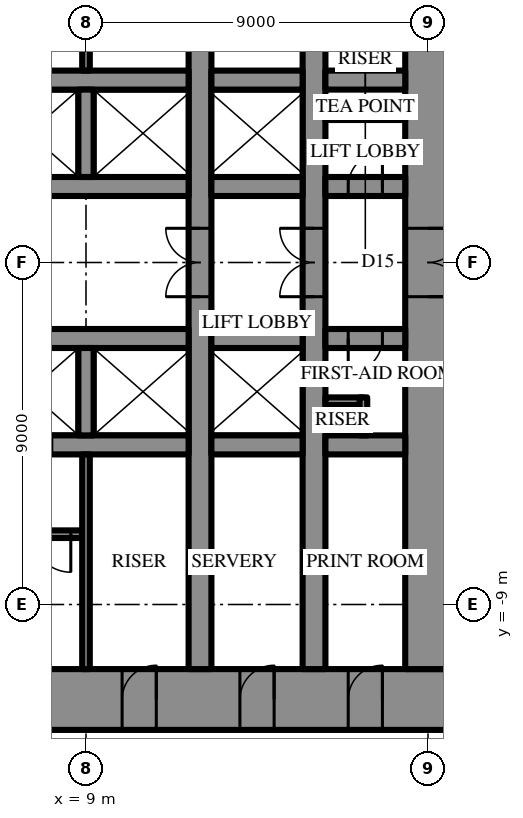
"""IFC4 building model, lengths in metres.
Left out: names, types, materials, properties, quantities, classifications, styles, units other than length and angle.
Written with IfcOpenShell. Run it as: python <this file> out.ifc"""

import sys

from ifc_helpers import new_model, si_unit, direction, frame, frame_2d, origin, place, context, subcontext, project, spatial, rectangle, extrude, element, fill, save


model = new_model("IFC4")
c1 = context("Model", 3, precision=1e-05, world=origin(), true_north=direction((0.0, 1.0)))
c2 = subcontext(c1, "Body", "Model", "MODEL_VIEW")
j1 = project(units=[si_unit("LENGTHUNIT", "METRE"), si_unit("PLANEANGLEUNIT", "RADIAN")], contexts=[c1])
p1 = place(None, origin())
s1 = spatial("IfcSite", under=j1, at=p1, CompositionType="ELEMENT")
p2 = place(p1, origin())
s2 = spatial("IfcBuilding", under=s1, at=p2, CompositionType="ELEMENT")
p3 = place(p2, frame((0.0, 0.0, 153.1)))
s3 = spatial("IfcBuildingStorey", under=s2, at=p3, CompositionType="ELEMENT", Elevation=153.1)
p4 = place(p3, frame((18.6, -11.5, 0.0), z_axis=(0.0, 0.0, 1.0), x_axis=(-1.0, 0.0, 0.0)))
e1 = element("IfcWall", 1, at=p4, inside=s3, PredefinedType="SHEAR", context=c2, shape_type="SweptSolid", body=[
    extrude(rectangle(XDim=37.2, YDim=1.6, at=frame_2d((18.6, 0.0))), origin(), (0.0, 0.0, 1.0), 4.2),
])
p5 = place(p4, frame((19.45, 0.0, 0.0)))
e2 = element("IfcOpeningElement", 2, at=p5, cuts=e1, PredefinedType="OPENING", context=c2, shape_type="SweptSolid", body=[
    extrude(rectangle(XDim=0.9, YDim=2.2, at=frame_2d((0.45, 1.1))), frame((0.0, 0.81, 0.0), z_axis=(0.0, -1.0, 0.0), x_axis=(1.0, 0.0, 0.0)), (0.0, 0.0, 1.0), 1.62),
])
p6 = place(p4, frame((22.45, 0.0, 0.0)))
e3 = element("IfcOpeningElement", 3, at=p6, cuts=e1, PredefinedType="OPENING", context=c2, shape_type="SweptSolid", body=[
    extrude(rectangle(XDim=0.9, YDim=2.2, at=frame_2d((0.45, 1.1))), frame((0.0, 0.81, 0.0), z_axis=(0.0, -1.0, 0.0), x_axis=(1.0, 0.0, 0.0)), (0.0, 0.0, 1.0), 1.62),
])
p7 = place(p4, frame((25.5, 0.0, 0.0)))
e4 = element("IfcOpeningElement", 4, at=p7, cuts=e1, PredefinedType="OPENING", context=c2, shape_type="SweptSolid", body=[
    extrude(rectangle(XDim=1.0, YDim=2.2, at=frame_2d((0.5, 1.1))), frame((0.0, 0.81, 0.0), z_axis=(0.0, -1.0, 0.0), x_axis=(1.0, 0.0, 0.0)), (0.0, 0.0, 1.0), 1.62),
])
p8 = place(p4, frame((1.8, 0.0, 0.0)))
e5 = element("IfcOpeningElement", 5, at=p8, cuts=e1, PredefinedType="OPENING", context=c2, shape_type="SweptSolid", body=[
    extrude(rectangle(XDim=0.9, YDim=2.2, at=frame_2d((0.45, 1.1))), frame((0.0, 0.81, 0.0), z_axis=(0.0, -1.0, 0.0), x_axis=(1.0, 0.0, 0.0)), (0.0, 0.0, 1.0), 1.62),
])
p9 = place(p4, frame((4.65, 0.0, 0.0)))
e6 = element("IfcOpeningElement", 6, at=p9, cuts=e1, PredefinedType="OPENING", context=c2, shape_type="SweptSolid", body=[
    extrude(rectangle(XDim=0.9, YDim=2.2, at=frame_2d((0.45, 1.1))), frame((0.0, 0.81, 0.0), z_axis=(0.0, -1.0, 0.0), x_axis=(1.0, 0.0, 0.0)), (0.0, 0.0, 1.0), 1.62),
])
p10 = place(p4, frame((7.75, 0.0, 0.0)))
e7 = element("IfcOpeningElement", 7, at=p10, cuts=e1, PredefinedType="OPENING", context=c2, shape_type="SweptSolid", body=[
    extrude(rectangle(XDim=0.9, YDim=2.2, at=frame_2d((0.45, 1.1))), frame((0.0, 0.81, 0.0), z_axis=(0.0, -1.0, 0.0), x_axis=(1.0, 0.0, 0.0)), (0.0, 0.0, 1.0), 1.62),
])
p11 = place(p4, frame((28.55, 0.0, 0.0)))
e8 = element("IfcOpeningElement", 8, at=p11, cuts=e1, PredefinedType="OPENING", context=c2, shape_type="SweptSolid", body=[
    extrude(rectangle(XDim=0.9, YDim=2.2, at=frame_2d((0.45, 1.1))), frame((0.0, 0.81, 0.0), z_axis=(0.0, -1.0, 0.0), x_axis=(1.0, 0.0, 0.0)), (0.0, 0.0, 1.0), 1.62),
])
p12 = place(p4, frame((31.65, 0.0, 0.0)))
e9 = element("IfcOpeningElement", 9, at=p12, cuts=e1, PredefinedType="OPENING", context=c2, shape_type="SweptSolid", body=[
    extrude(rectangle(XDim=0.9, YDim=2.2, at=frame_2d((0.45, 1.1))), frame((0.0, 0.81, 0.0), z_axis=(0.0, -1.0, 0.0), x_axis=(1.0, 0.0, 0.0)), (0.0, 0.0, 1.0), 1.62),
])
p13 = place(p4, frame((34.5, 0.0, 0.0)))
e10 = element("IfcOpeningElement", 10, at=p13, cuts=e1, PredefinedType="OPENING", context=c2, shape_type="SweptSolid", body=[
    extrude(rectangle(XDim=0.9, YDim=2.2, at=frame_2d((0.45, 1.1))), frame((0.0, 0.81, 0.0), z_axis=(0.0, -1.0, 0.0), x_axis=(1.0, 0.0, 0.0)), (0.0, 0.0, 1.0), 1.62),
])
p14 = place(p3, frame((18.0, -10.7, 0.0), z_axis=(0.0, 0.0, 1.0), x_axis=(0.0, 1.0, 0.0)))
e11 = element("IfcWall", 11, at=p14, inside=s3, PredefinedType="SHEAR", context=c2, shape_type="SweptSolid", body=[
    extrude(rectangle(XDim=21.4, YDim=1.2, at=frame_2d((10.7, 0.0))), origin(), (0.0, 0.0, 1.0), 4.2),
])
p15 = place(p14, frame((9.8, 0.0, 0.0)))
e12 = element("IfcOpeningElement", 12, at=p15, cuts=e11, PredefinedType="OPENING", context=c2, shape_type="SweptSolid", body=[
    extrude(rectangle(XDim=1.8, YDim=2.4, at=frame_2d((0.9, 1.2))), frame((0.0, 0.61, 0.0), z_axis=(0.0, -1.0, 0.0), x_axis=(1.0, 0.0, 0.0)), (0.0, 0.0, 1.0), 1.22),
])
p16 = place(p3, frame((12.0, -10.7, 0.0), z_axis=(0.0, 0.0, 1.0), x_axis=(0.0, 1.0, 0.0)))
e13 = element("IfcWall", 13, at=p16, inside=s3, PredefinedType="SHEAR", context=c2, shape_type="SweptSolid", body=[
    extrude(rectangle(XDim=21.4, YDim=0.6, at=frame_2d((10.7, 0.0))), origin(), (0.0, 0.0, 1.0), 4.2),
])
p17 = place(p16, frame((9.8, 0.0, 0.0)))
e14 = element("IfcOpeningElement", 14, at=p17, cuts=e13, PredefinedType="OPENING", context=c2, shape_type="SweptSolid", body=[
    extrude(rectangle(XDim=1.8, YDim=2.4, at=frame_2d((0.9, 1.2))), frame((0.0, 0.31, 0.0), z_axis=(0.0, -1.0, 0.0), x_axis=(1.0, 0.0, 0.0)), (0.0, 0.0, 1.0), 0.62),
])
p18 = place(p3, frame((15.0, -10.7, 0.0), z_axis=(0.0, 0.0, 1.0), x_axis=(0.0, 1.0, 0.0)))
e15 = element("IfcWall", 15, at=p18, inside=s3, PredefinedType="SHEAR", context=c2, shape_type="SweptSolid", body=[
    extrude(rectangle(XDim=21.4, YDim=0.6, at=frame_2d((10.7, 0.0))), origin(), (0.0, 0.0, 1.0), 4.2),
])
p19 = place(p18, frame((9.8, 0.0, 0.0)))
e16 = element("IfcOpeningElement", 16, at=p19, cuts=e15, PredefinedType="OPENING", context=c2, shape_type="SweptSolid", body=[
    extrude(rectangle(XDim=1.8, YDim=2.4, at=frame_2d((0.9, 1.2))), frame((0.0, 0.31, 0.0), z_axis=(0.0, -1.0, 0.0), x_axis=(1.0, 0.0, 0.0)), (0.0, 0.0, 1.0), 0.62),
])
p20 = place(p3, frame((-3.2, 2.0, 0.0), z_axis=(0.0, 0.0, 1.0), x_axis=(1.0, 0.0, 0.0)))
e17 = element("IfcWall", 17, at=p20, inside=s3, PredefinedType="SHEAR", context=c2, shape_type="SweptSolid", body=[
    extrude(rectangle(XDim=14.9, YDim=0.5, at=frame_2d((7.45, 0.0))), origin(), (0.0, 0.0, 1.0), 4.2),
])
p21 = place(p20, frame((1.15, 0.0, 0.0)))
e18 = element("IfcOpeningElement", 18, at=p21, cuts=e17, PredefinedType="OPENING", context=c2, shape_type="SweptSolid", body=[
    extrude(rectangle(XDim=1.1, YDim=2.2, at=frame_2d((0.55, 1.1))), frame((0.0, 0.26, 0.0), z_axis=(0.0, -1.0, 0.0), x_axis=(1.0, 0.0, 0.0)), (0.0, 0.0, 1.0), 0.52),
])
p22 = place(p20, frame((4.15, 0.0, 0.0)))
e19 = element("IfcOpeningElement", 19, at=p22, cuts=e17, PredefinedType="OPENING", context=c2, shape_type="SweptSolid", body=[
    extrude(rectangle(XDim=1.1, YDim=2.2, at=frame_2d((0.55, 1.1))), frame((0.0, 0.26, 0.0), z_axis=(0.0, -1.0, 0.0), x_axis=(1.0, 0.0, 0.0)), (0.0, 0.0, 1.0), 0.52),
])
p23 = place(p20, frame((7.15, 0.0, 0.0)))
e20 = element("IfcOpeningElement", 20, at=p23, cuts=e17, PredefinedType="OPENING", context=c2, shape_type="SweptSolid", body=[
    extrude(rectangle(XDim=1.1, YDim=2.2, at=frame_2d((0.55, 1.1))), frame((0.0, 0.26, 0.0), z_axis=(0.0, -1.0, 0.0), x_axis=(1.0, 0.0, 0.0)), (0.0, 0.0, 1.0), 0.52),
])
p24 = place(p20, frame((10.15, 0.0, 0.0)))
e21 = element("IfcOpeningElement", 21, at=p24, cuts=e17, PredefinedType="OPENING", context=c2, shape_type="SweptSolid", body=[
    extrude(rectangle(XDim=1.1, YDim=2.2, at=frame_2d((0.55, 1.1))), frame((0.0, 0.26, 0.0), z_axis=(0.0, -1.0, 0.0), x_axis=(1.0, 0.0, 0.0)), (0.0, 0.0, 1.0), 0.52),
])
p25 = place(p3, frame((12.3, 2.0, 0.0), z_axis=(0.0, 0.0, 1.0), x_axis=(1.0, 0.0, 0.0)))
e22 = element("IfcWall", 22, at=p25, inside=s3, PredefinedType="SHEAR", context=c2, shape_type="SweptSolid", body=[
    extrude(rectangle(XDim=2.4, YDim=0.5, at=frame_2d((1.2, 0.0))), origin(), (0.0, 0.0, 1.0), 4.2),
])
p26 = place(p3, frame((15.3, 2.0, 0.0), z_axis=(0.0, 0.0, 1.0), x_axis=(1.0, 0.0, 0.0)))
e23 = element("IfcWall", 23, at=p26, inside=s3, PredefinedType="SHEAR", context=c2, shape_type="SweptSolid", body=[
    extrude(rectangle(XDim=2.1, YDim=0.5, at=frame_2d((1.05, 0.0))), origin(), (0.0, 0.0, 1.0), 4.2),
])
p27 = place(p26, frame((0.6, 0.0, 0.0)))
e24 = element("IfcOpeningElement", 24, at=p27, cuts=e23, PredefinedType="OPENING", context=c2, shape_type="SweptSolid", body=[
    extrude(rectangle(XDim=0.9, YDim=2.2, at=frame_2d((0.45, 1.1))), frame((0.0, 0.26, 0.0), z_axis=(0.0, -1.0, 0.0), x_axis=(1.0, 0.0, 0.0)), (0.0, 0.0, 1.0), 0.52),
])
p28 = place(p3, frame((-11.7, 4.8, 0.0), z_axis=(0.0, 0.0, 1.0), x_axis=(1.0, 0.0, 0.0)))
e25 = element("IfcWall", 25, at=p28, inside=s3, PredefinedType="SHEAR", context=c2, shape_type="SweptSolid", body=[
    extrude(rectangle(XDim=23.4, YDim=0.5, at=frame_2d((11.7, 0.0))), origin(), (0.0, 0.0, 1.0), 4.2),
])
p29 = place(p28, frame((6.6, 0.0, 0.0)))
e26 = element("IfcOpeningElement", 26, at=p29, cuts=e25, PredefinedType="OPENING", context=c2, shape_type="SweptSolid", body=[
    extrude(rectangle(XDim=1.2, YDim=2.2, at=frame_2d((0.6, 1.1))), frame((0.0, 0.26, 0.0), z_axis=(0.0, -1.0, 0.0), x_axis=(1.0, 0.0, 0.0)), (0.0, 0.0, 1.0), 0.52),
])
p30 = place(p28, frame((3.6, 0.0, 0.0)))
e27 = element("IfcOpeningElement", 27, at=p30, cuts=e25, PredefinedType="OPENING", context=c2, shape_type="SweptSolid", body=[
    extrude(rectangle(XDim=1.2, YDim=2.2, at=frame_2d((0.6, 1.1))), frame((0.0, 0.26, 0.0), z_axis=(0.0, -1.0, 0.0), x_axis=(1.0, 0.0, 0.0)), (0.0, 0.0, 1.0), 0.52),
])
p31 = place(p3, frame((12.3, 4.8, 0.0), z_axis=(0.0, 0.0, 1.0), x_axis=(1.0, 0.0, 0.0)))
e28 = element("IfcWall", 28, at=p31, inside=s3, PredefinedType="SHEAR", context=c2, shape_type="SweptSolid", body=[
    extrude(rectangle(XDim=2.4, YDim=0.5, at=frame_2d((1.2, 0.0))), origin(), (0.0, 0.0, 1.0), 4.2),
])
p32 = place(p3, frame((15.3, 4.8, 0.0), z_axis=(0.0, 0.0, 1.0), x_axis=(1.0, 0.0, 0.0)))
e29 = element("IfcWall", 29, at=p32, inside=s3, PredefinedType="SHEAR", context=c2, shape_type="SweptSolid", body=[
    extrude(rectangle(XDim=2.1, YDim=0.5, at=frame_2d((1.05, 0.0))), origin(), (0.0, 0.0, 1.0), 4.2),
])
p33 = place(p3, frame((9.0, 2.25, 0.0), z_axis=(0.0, 0.0, 1.0), x_axis=(0.0, 1.0, 0.0)))
e30 = element("IfcWall", 30, at=p33, inside=s3, PredefinedType="SHEAR", context=c2, shape_type="SweptSolid", body=[
    extrude(rectangle(XDim=2.3, YDim=0.4, at=frame_2d((1.15, 0.0))), origin(), (0.0, 0.0, 1.0), 4.2),
])
p34 = place(p3, frame((17.4, -2.0, 0.0), z_axis=(0.0, 0.0, 1.0), x_axis=(-1.0, 0.0, 0.0)))
e31 = element("IfcWall", 31, at=p34, inside=s3, PredefinedType="SHEAR", context=c2, shape_type="SweptSolid", body=[
    extrude(rectangle(XDim=2.1, YDim=0.5, at=frame_2d((1.05, 0.0))), origin(), (0.0, 0.0, 1.0), 4.2),
])
p35 = place(p34, frame((0.6, 0.0, 0.0)))
e32 = element("IfcOpeningElement", 32, at=p35, cuts=e31, PredefinedType="OPENING", context=c2, shape_type="SweptSolid", body=[
    extrude(rectangle(XDim=0.9, YDim=2.2, at=frame_2d((0.45, 1.1))), frame((0.0, 0.26, 0.0), z_axis=(0.0, -1.0, 0.0), x_axis=(1.0, 0.0, 0.0)), (0.0, 0.0, 1.0), 0.52),
])
p36 = place(p3, frame((14.7, -2.0, 0.0), z_axis=(0.0, 0.0, 1.0), x_axis=(-1.0, 0.0, 0.0)))
e33 = element("IfcWall", 33, at=p36, inside=s3, PredefinedType="SHEAR", context=c2, shape_type="SweptSolid", body=[
    extrude(rectangle(XDim=2.4, YDim=0.5, at=frame_2d((1.2, 0.0))), origin(), (0.0, 0.0, 1.0), 4.2),
])
p37 = place(p3, frame((11.7, -2.0, 0.0), z_axis=(0.0, 0.0, 1.0), x_axis=(-1.0, 0.0, 0.0)))
e34 = element("IfcWall", 34, at=p37, inside=s3, PredefinedType="SHEAR", context=c2, shape_type="SweptSolid", body=[
    extrude(rectangle(XDim=5.9, YDim=0.5, at=frame_2d((2.95, 0.0))), origin(), (0.0, 0.0, 1.0), 4.2),
])
p38 = place(p3, frame((17.4, -4.8, 0.0), z_axis=(0.0, 0.0, 1.0), x_axis=(-1.0, 0.0, 0.0)))
e35 = element("IfcWall", 35, at=p38, inside=s3, PredefinedType="SHEAR", context=c2, shape_type="SweptSolid", body=[
    extrude(rectangle(XDim=2.1, YDim=0.5, at=frame_2d((1.05, 0.0))), origin(), (0.0, 0.0, 1.0), 4.2),
])
p39 = place(p3, frame((14.7, -4.8, 0.0), z_axis=(0.0, 0.0, 1.0), x_axis=(-1.0, 0.0, 0.0)))
e36 = element("IfcWall", 36, at=p39, inside=s3, PredefinedType="SHEAR", context=c2, shape_type="SweptSolid", body=[
    extrude(rectangle(XDim=2.4, YDim=0.5, at=frame_2d((1.2, 0.0))), origin(), (0.0, 0.0, 1.0), 4.2),
])
p40 = place(p3, frame((11.7, -4.8, 0.0), z_axis=(0.0, 0.0, 1.0), x_axis=(-1.0, 0.0, 0.0)))
e37 = element("IfcWall", 37, at=p40, inside=s3, PredefinedType="SHEAR", context=c2, shape_type="SweptSolid", body=[
    extrude(rectangle(XDim=23.4, YDim=0.5, at=frame_2d((11.7, 0.0))), origin(), (0.0, 0.0, 1.0), 4.2),
])
p41 = place(p40, frame((6.6, 0.0, 0.0)))
e38 = element("IfcOpeningElement", 38, at=p41, cuts=e37, PredefinedType="OPENING", context=c2, shape_type="SweptSolid", body=[
    extrude(rectangle(XDim=1.2, YDim=2.2, at=frame_2d((0.6, 1.1))), frame((0.0, 0.26, 0.0), z_axis=(0.0, -1.0, 0.0), x_axis=(1.0, 0.0, 0.0)), (0.0, 0.0, 1.0), 0.52),
])
p42 = place(p40, frame((3.6, 0.0, 0.0)))
e39 = element("IfcOpeningElement", 39, at=p42, cuts=e37, PredefinedType="OPENING", context=c2, shape_type="SweptSolid", body=[
    extrude(rectangle(XDim=1.2, YDim=2.2, at=frame_2d((0.6, 1.1))), frame((0.0, 0.26, 0.0), z_axis=(0.0, -1.0, 0.0), x_axis=(1.0, 0.0, 0.0)), (0.0, 0.0, 1.0), 0.52),
])
p43 = place(p3, frame((9.0, -2.25, 0.0), z_axis=(0.0, 0.0, 1.0), x_axis=(0.0, -1.0, 0.0)))
e40 = element("IfcWall", 40, at=p43, inside=s3, PredefinedType="SHEAR", context=c2, shape_type="SweptSolid", body=[
    extrude(rectangle(XDim=2.3, YDim=0.4, at=frame_2d((1.15, 0.0))), origin(), (0.0, 0.0, 1.0), 4.2),
])
p44 = place(p3, frame((8.9, -7.15, 0.0), z_axis=(0.0, 0.0, 1.0), x_axis=(-1.0, 0.0, 0.0)))
e41 = element("IfcWall", 41, at=p44, inside=s3, PredefinedType="SHEAR", context=c2, shape_type="SweptSolid", body=[
    extrude(rectangle(XDim=8.6, YDim=0.2, at=frame_2d((4.3, 0.0))), origin(), (0.0, 0.0, 1.0), 4.2),
])
p45 = place(p44, frame((0.3, 0.0, 0.0)))
e42 = element("IfcOpeningElement", 42, at=p45, cuts=e41, PredefinedType="OPENING", context=c2, shape_type="SweptSolid", body=[
    extrude(rectangle(XDim=1.0, YDim=2.2, at=frame_2d((0.5, 1.1))), frame((0.0, 0.11, 0.0), z_axis=(0.0, -1.0, 0.0), x_axis=(1.0, 0.0, 0.0)), (0.0, 0.0, 1.0), 0.22),
])
for number, where, z_axis, x_axis in (
    (43, (9.0, 5.05, 0.0), (0.0, 0.0, 1.0), (0.0, 1.0, 0.0)),
    (44, (9.0, -5.05, 0.0), (0.0, 0.0, 1.0), (0.0, -1.0, 0.0)),
):
    element("IfcWall", number, at=place(p3, frame(where, z_axis=z_axis, x_axis=x_axis)), inside=s3, PredefinedType="PARTITIONING", context=c2, shape_type="SweptSolid", body=[
        extrude(rectangle(XDim=5.65, YDim=0.2, at=frame_2d((2.825, 0.0))), origin(), (0.0, 0.0, 1.0), 4.0),
    ])
p46 = place(p3, frame((15.3, 3.85, 0.0), z_axis=(0.0, 0.0, 1.0), x_axis=(1.0, 0.0, 0.0)))
e45 = element("IfcWall", 45, at=p46, inside=s3, PredefinedType="PARTITIONING", context=c2, shape_type="SweptSolid", body=[
    extrude(rectangle(XDim=2.1, YDim=0.2, at=frame_2d((1.05, 0.0))), origin(), (0.0, 0.0, 1.0), 4.0),
])
for number, where, z_axis, x_axis in (
    (46, (16.3, -3.65, 0.0), (0.0, 0.0, 1.0), (-1.0, 0.0, 0.0)),
    (47, (16.3, -3.55, 0.0), (0.0, 0.0, 1.0), (0.0, -1.0, 0.0)),
):
    element("IfcWall", number, at=place(p3, frame(where, z_axis=z_axis, x_axis=x_axis)), inside=s3, PredefinedType="PARTITIONING", context=c2, shape_type="SweptSolid", body=[
        extrude(rectangle(XDim=1.0, YDim=0.2, at=frame_2d((0.5, 0.0))), origin(), (0.0, 0.0, 1.0), 4.0),
    ])
p47 = place(p15, frame((1.8, 0.0, 0.0), z_axis=(0.0, 0.0, 1.0), x_axis=(-1.0, 0.0, 0.0)))
e48 = element("IfcDoor", 48, at=p47, inside=s3, OperationType="DOUBLE_DOOR_SINGLE_SWING", PredefinedType="DOOR", context=c2, shape_type="SweptSolid", body=[
    extrude(rectangle(XDim=1.8, YDim=2.4, at=frame_2d((0.9, 1.2))), frame((0.0, 0.025, 0.0), z_axis=(0.0, -1.0, 0.0), x_axis=(1.0, 0.0, 0.0)), (0.0, 0.0, 1.0), 0.05),
])
fill(e12, e48)
p48 = place(p45, origin())
e49 = element("IfcDoor", 49, at=p48, inside=s3, OperationType="SINGLE_SWING_RIGHT", PredefinedType="DOOR", context=c2, shape_type="SweptSolid", body=[
    extrude(rectangle(XDim=1.0, YDim=2.2, at=frame_2d((0.5, 1.1))), frame((0.0, 0.025, 0.0), z_axis=(0.0, -1.0, 0.0), x_axis=(1.0, 0.0, 0.0)), (0.0, 0.0, 1.0), 0.05),
])
fill(e42, e49)
p49 = place(p8, frame((0.9, 0.0, 0.0), z_axis=(0.0, 0.0, 1.0), x_axis=(-1.0, 0.0, 0.0)))
e50 = element("IfcDoor", 50, at=p49, inside=s3, OperationType="SINGLE_SWING_LEFT", PredefinedType="DOOR", context=c2, shape_type="SweptSolid", body=[
    extrude(rectangle(XDim=0.9, YDim=2.2, at=frame_2d((0.45, 1.1))), frame((0.0, 0.025, 0.0), z_axis=(0.0, -1.0, 0.0), x_axis=(1.0, 0.0, 0.0)), (0.0, 0.0, 1.0), 0.05),
])
fill(e5, e50)
p50 = place(p9, frame((0.9, 0.0, 0.0), z_axis=(0.0, 0.0, 1.0), x_axis=(-1.0, 0.0, 0.0)))
e51 = element("IfcDoor", 51, at=p50, inside=s3, OperationType="SINGLE_SWING_LEFT", PredefinedType="DOOR", context=c2, shape_type="SweptSolid", body=[
    extrude(rectangle(XDim=0.9, YDim=2.2, at=frame_2d((0.45, 1.1))), frame((0.0, 0.025, 0.0), z_axis=(0.0, -1.0, 0.0), x_axis=(1.0, 0.0, 0.0)), (0.0, 0.0, 1.0), 0.05),
])
fill(e6, e51)
p51 = place(p10, frame((0.9, 0.0, 0.0), z_axis=(0.0, 0.0, 1.0), x_axis=(-1.0, 0.0, 0.0)))
e52 = element("IfcDoor", 52, at=p51, inside=s3, OperationType="SINGLE_SWING_LEFT", PredefinedType="DOOR", context=c2, shape_type="SweptSolid", body=[
    extrude(rectangle(XDim=0.9, YDim=2.2, at=frame_2d((0.45, 1.1))), frame((0.0, 0.025, 0.0), z_axis=(0.0, -1.0, 0.0), x_axis=(1.0, 0.0, 0.0)), (0.0, 0.0, 1.0), 0.05),
])
fill(e7, e52)
p52 = place(p27, origin())
e53 = element("IfcDoor", 53, at=p52, inside=s3, OperationType="SINGLE_SWING_LEFT", PredefinedType="DOOR", context=c2, shape_type="SweptSolid", body=[
    extrude(rectangle(XDim=0.9, YDim=2.2, at=frame_2d((0.45, 1.1))), frame((0.0, 0.025, 0.0), z_axis=(0.0, -1.0, 0.0), x_axis=(1.0, 0.0, 0.0)), (0.0, 0.0, 1.0), 0.05),
])
fill(e24, e53)
p53 = place(p35, origin())
e54 = element("IfcDoor", 54, at=p53, inside=s3, OperationType="SINGLE_SWING_LEFT", PredefinedType="DOOR", context=c2, shape_type="SweptSolid", body=[
    extrude(rectangle(XDim=0.9, YDim=2.2, at=frame_2d((0.45, 1.1))), frame((0.0, 0.025, 0.0), z_axis=(0.0, -1.0, 0.0), x_axis=(1.0, 0.0, 0.0)), (0.0, 0.0, 1.0), 0.05),
])
fill(e32, e54)
p54 = place(p17, origin())
e55 = element("IfcDoor", 55, at=p54, inside=s3, OperationType="DOUBLE_DOOR_SINGLE_SWING", PredefinedType="DOOR", context=c2, shape_type="SweptSolid", body=[
    extrude(rectangle(XDim=1.8, YDim=2.4, at=frame_2d((0.9, 1.2))), frame((0.0, 0.025, 0.0), z_axis=(0.0, -1.0, 0.0), x_axis=(1.0, 0.0, 0.0)), (0.0, 0.0, 1.0), 0.05),
])
fill(e14, e55)
p55 = place(p19, origin())
e56 = element("IfcDoor", 56, at=p55, inside=s3, OperationType="DOUBLE_DOOR_SINGLE_SWING", PredefinedType="DOOR", context=c2, shape_type="SweptSolid", body=[
    extrude(rectangle(XDim=1.8, YDim=2.4, at=frame_2d((0.9, 1.2))), frame((0.0, 0.025, 0.0), z_axis=(0.0, -1.0, 0.0), x_axis=(1.0, 0.0, 0.0)), (0.0, 0.0, 1.0), 0.05),
])
fill(e16, e56)
save(model, sys.argv[1])
